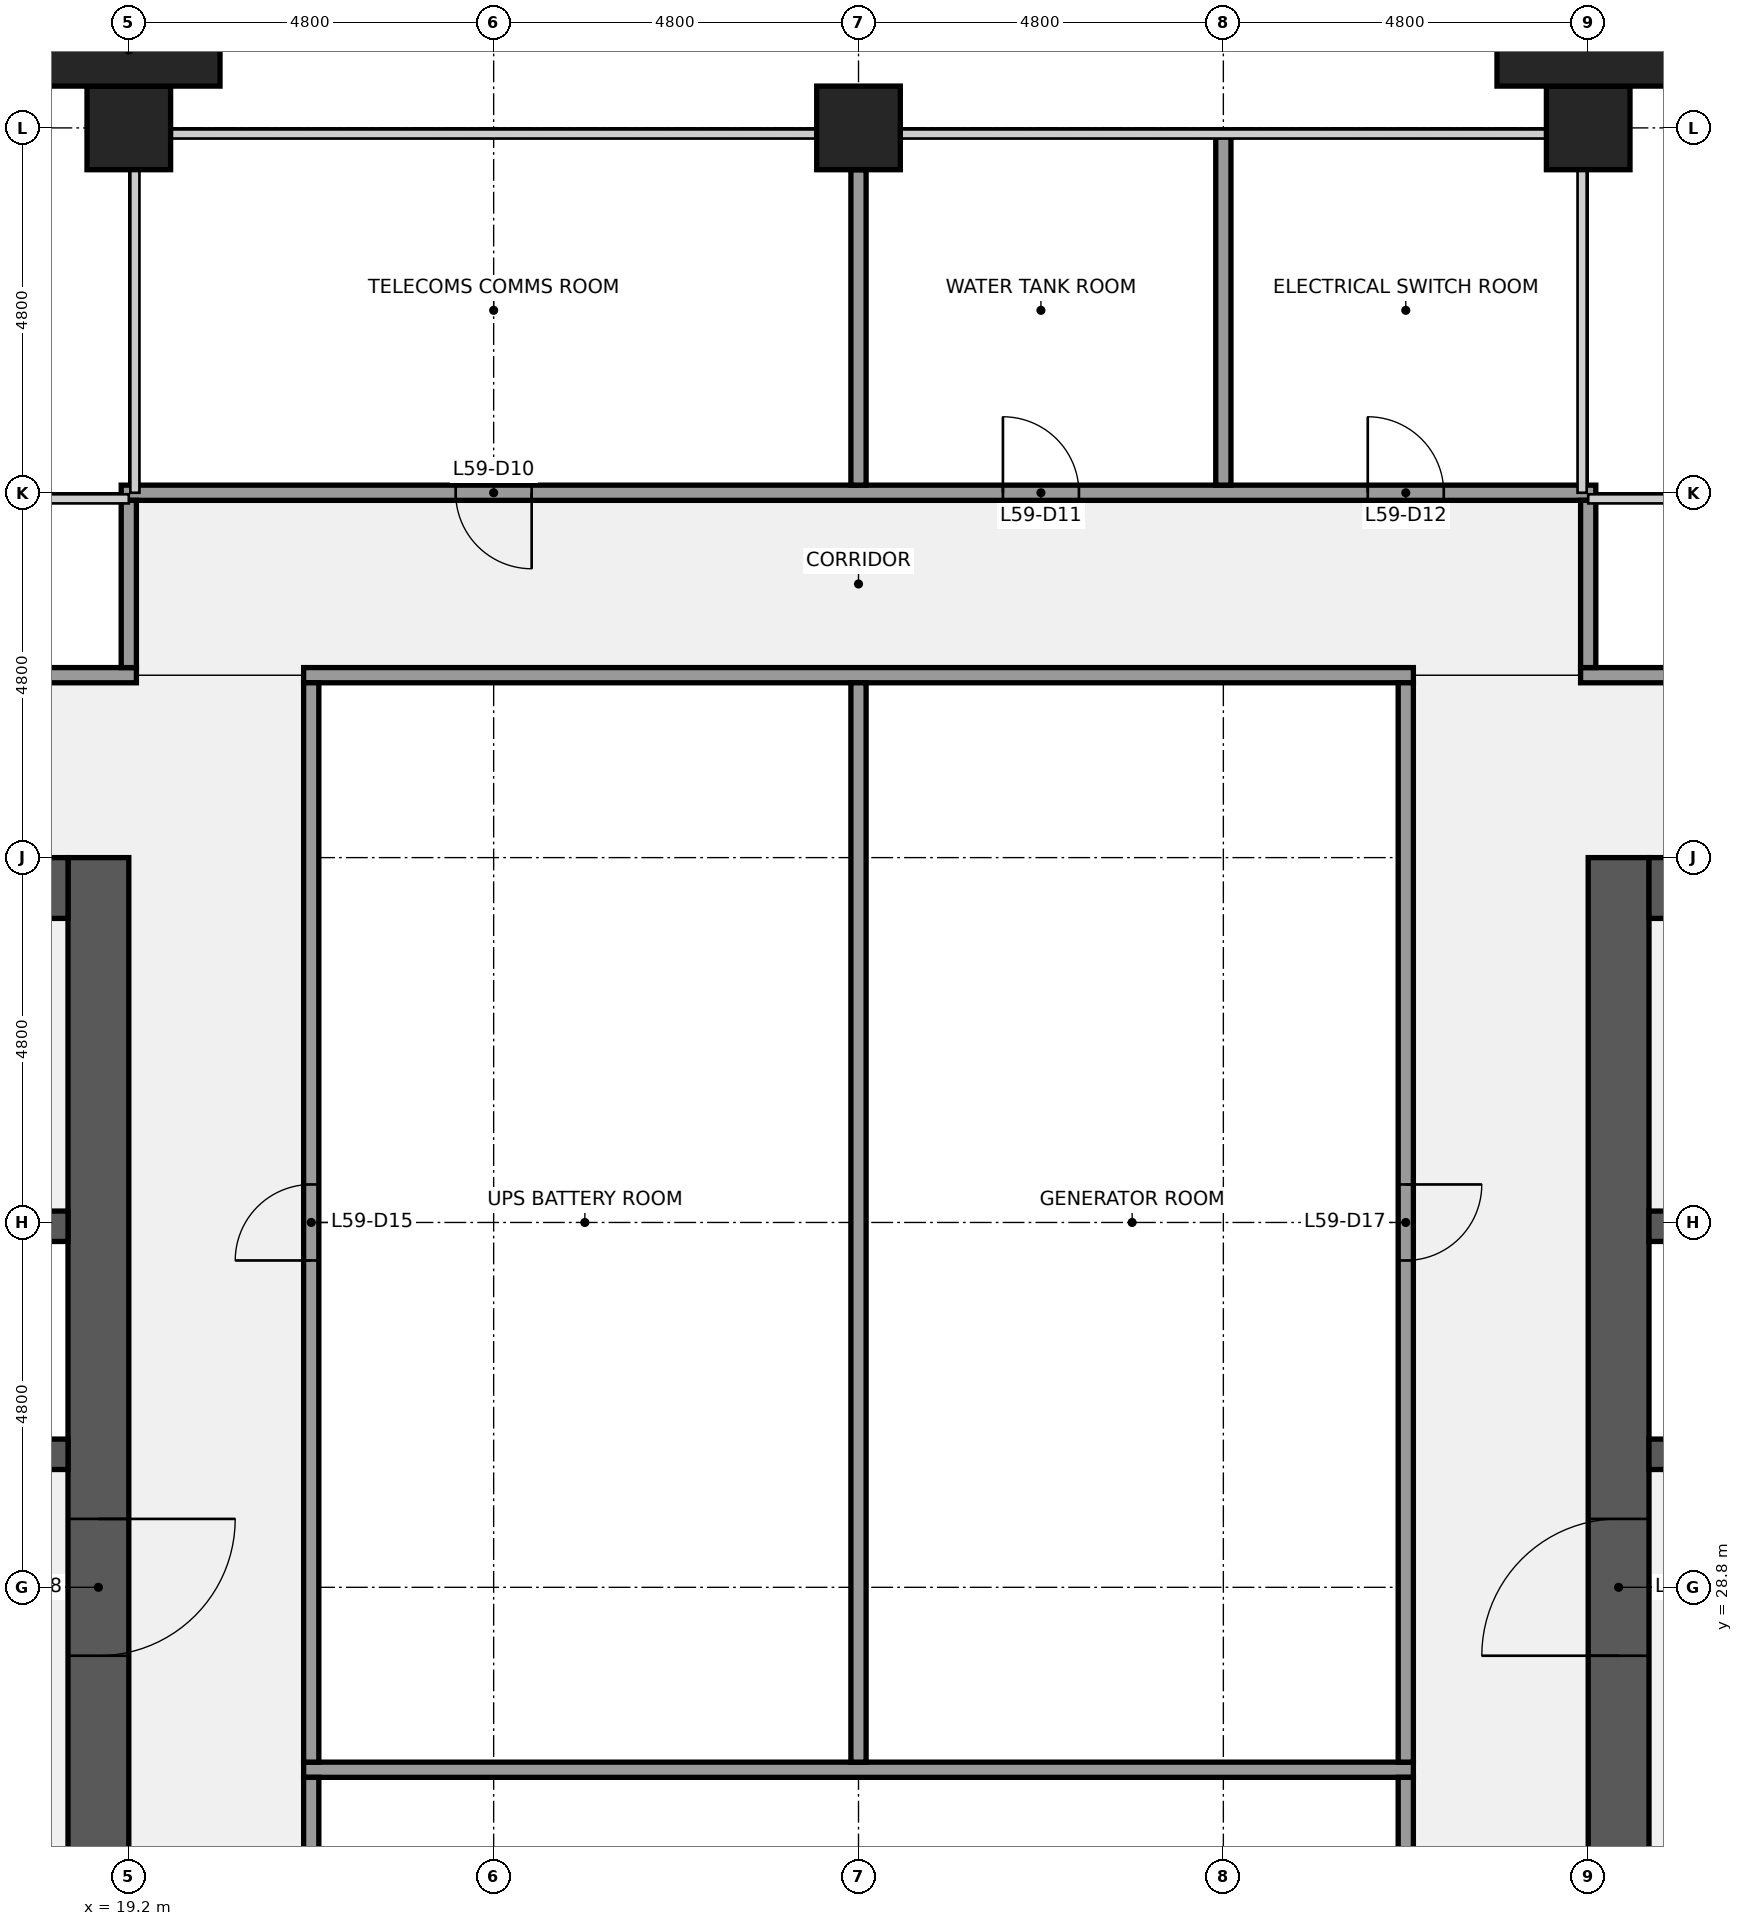
"""IFC4 building model, lengths in metres.
Left out: names, types, materials, properties, quantities, classifications, styles, units other than length and angle.
Written with IfcOpenShell. Run it as: python <this file> out.ifc"""

import sys

from ifc_helpers import new_model, si_unit, direction, frame, frame_2d, origin, origin_2d, place, context, subcontext, project, spatial, rectangle, extrude, element, fill, save


model = new_model("IFC4")
c1 = context("Model", 3, precision=1e-05, world=origin(), true_north=direction((0.0, 1.0)))
c2 = subcontext(c1, "Body", "Model", "MODEL_VIEW")
j1 = project(units=[si_unit("LENGTHUNIT", "METRE"), si_unit("PLANEANGLEUNIT", "RADIAN")], contexts=[c1])
p1 = place(None, origin())
s1 = spatial("IfcSite", under=j1, at=p1, CompositionType="ELEMENT")
p2 = place(p1, origin())
s2 = spatial("IfcBuilding", under=s1, at=p2, CompositionType="ELEMENT")
p3 = place(p2, frame((0.0, 0.0, 265.2)))
s3 = spatial("IfcBuildingStorey", under=s2, at=p3, CompositionType="ELEMENT", Elevation=265.2)
for number, where, z_axis, x_axis in (
    (1, (19.2, 48.0, 0.0), (0.0, 0.0, 1.0), (1.0, 0.0, 0.0)),
    (2, (28.8, 48.0, 0.0), (0.0, 0.0, 1.0), (1.0, 0.0, 0.0)),
    (3, (38.4, 48.0, 0.0), (0.0, 0.0, 1.0), (1.0, 0.0, 0.0)),
):
    element("IfcColumn", number, at=place(p3, frame(where, z_axis=z_axis, x_axis=x_axis)), inside=s3, PredefinedType="COLUMN", context=c2, shape_type="SweptSolid", body=[
        extrude(rectangle(XDim=1.1, YDim=1.1, at=origin_2d()), origin(), (0.0, 0.0, 1.0), 4.5),
    ])
p4 = place(p3, frame((18.8, 38.4, 0.0), z_axis=(0.0, 0.0, 1.0), x_axis=(0.0, -1.0, 0.0)))
e4 = element("IfcWall", 4, at=p4, inside=s3, PredefinedType="SHEAR", context=c2, shape_type="SweptSolid", body=[
    extrude(rectangle(XDim=28.8, YDim=0.8, at=frame_2d((14.4, 0.0))), origin(), (0.0, 0.0, 1.0), 4.1),
])
p5 = place(p4, frame((18.3, 0.0, 0.0)))
e5 = element("IfcOpeningElement", 5, at=p5, cuts=e4, PredefinedType="OPENING", context=c2, shape_type="SweptSolid", body=[
    extrude(rectangle(XDim=1.8, YDim=2.1, at=frame_2d((0.9, 1.05))), frame((0.0, 0.41, 0.0), z_axis=(0.0, -1.0, 0.0), x_axis=(1.0, 0.0, 0.0)), (0.0, 0.0, 1.0), 0.82),
])
p6 = place(p4, frame((8.7, 0.0, 0.0)))
e6 = element("IfcOpeningElement", 6, at=p6, cuts=e4, PredefinedType="OPENING", context=c2, shape_type="SweptSolid", body=[
    extrude(rectangle(XDim=1.8, YDim=2.1, at=frame_2d((0.9, 1.05))), frame((0.0, 0.41, 0.0), z_axis=(0.0, -1.0, 0.0), x_axis=(1.0, 0.0, 0.0)), (0.0, 0.0, 1.0), 0.82),
])
for number, where, z_axis, x_axis in (
    (7, (0.8, 30.55, 0.0), (0.0, 0.0, 1.0), (1.0, 0.0, 0.0)),
    (8, (0.8, 33.55, 0.0), (0.0, 0.0, 1.0), (1.0, 0.0, 0.0)),
):
    element("IfcWall", number, at=place(p3, frame(where, z_axis=z_axis, x_axis=x_axis)), inside=s3, PredefinedType="SHEAR", context=c2, shape_type="SweptSolid", body=[
        extrude(rectangle(XDim=17.6, YDim=0.4, at=frame_2d((8.8, 0.0))), origin(), (0.0, 0.0, 1.0), 4.1),
    ])
p7 = place(p3, frame((9.6, 38.0, 0.0), z_axis=(0.0, 0.0, 1.0), x_axis=(1.0, 0.0, 0.0)))
e9 = element("IfcWall", 9, at=p7, inside=s3, PredefinedType="SHEAR", context=c2, shape_type="SweptSolid", body=[
    extrude(rectangle(XDim=8.8, YDim=0.8, at=frame_2d((4.4, 0.0))), origin(), (0.0, 0.0, 1.0), 4.1),
])
p8 = place(p7, frame((6.65, 0.0, 0.0)))
e10 = element("IfcOpeningElement", 10, at=p8, cuts=e9, PredefinedType="OPENING", context=c2, shape_type="SweptSolid", body=[
    extrude(rectangle(XDim=1.1, YDim=2.1, at=frame_2d((0.55, 1.05))), frame((0.0, 0.41, 0.0), z_axis=(0.0, -1.0, 0.0), x_axis=(1.0, 0.0, 0.0)), (0.0, 0.0, 1.0), 0.82),
])
p9 = place(p3, frame((38.8, 9.6, 0.0), z_axis=(0.0, 0.0, 1.0), x_axis=(0.0, 1.0, 0.0)))
e11 = element("IfcWall", 11, at=p9, inside=s3, PredefinedType="SHEAR", context=c2, shape_type="SweptSolid", body=[
    extrude(rectangle(XDim=28.8, YDim=0.8, at=frame_2d((14.4, 0.0))), origin(), (0.0, 0.0, 1.0), 4.1),
])
p10 = place(p9, frame((8.7, 0.0, 0.0)))
e12 = element("IfcOpeningElement", 12, at=p10, cuts=e11, PredefinedType="OPENING", context=c2, shape_type="SweptSolid", body=[
    extrude(rectangle(XDim=1.8, YDim=2.1, at=frame_2d((0.9, 1.05))), frame((0.0, 0.41, 0.0), z_axis=(0.0, -1.0, 0.0), x_axis=(1.0, 0.0, 0.0)), (0.0, 0.0, 1.0), 0.82),
])
p11 = place(p9, frame((18.3, 0.0, 0.0)))
e13 = element("IfcOpeningElement", 13, at=p11, cuts=e11, PredefinedType="OPENING", context=c2, shape_type="SweptSolid", body=[
    extrude(rectangle(XDim=1.8, YDim=2.1, at=frame_2d((0.9, 1.05))), frame((0.0, 0.41, 0.0), z_axis=(0.0, -1.0, 0.0), x_axis=(1.0, 0.0, 0.0)), (0.0, 0.0, 1.0), 0.82),
])
for number, where, z_axis, x_axis in (
    (14, (39.2, 30.55, 0.0), (0.0, 0.0, 1.0), (1.0, 0.0, 0.0)),
    (15, (39.2, 33.55, 0.0), (0.0, 0.0, 1.0), (1.0, 0.0, 0.0)),
):
    element("IfcWall", number, at=place(p3, frame(where, z_axis=z_axis, x_axis=x_axis)), inside=s3, PredefinedType="SHEAR", context=c2, shape_type="SweptSolid", body=[
        extrude(rectangle(XDim=17.6, YDim=0.4, at=frame_2d((8.8, 0.0))), origin(), (0.0, 0.0, 1.0), 4.1),
    ])
p12 = place(p3, frame((39.2, 38.0, 0.0), z_axis=(0.0, 0.0, 1.0), x_axis=(1.0, 0.0, 0.0)))
e16 = element("IfcWall", 16, at=p12, inside=s3, PredefinedType="SHEAR", context=c2, shape_type="SweptSolid", body=[
    extrude(rectangle(XDim=4.0, YDim=0.8, at=frame_2d((2.0, 0.0))), origin(), (0.0, 0.0, 1.0), 4.1),
])
p13 = place(p12, frame((1.05, 0.0, 0.0)))
e17 = element("IfcOpeningElement", 17, at=p13, cuts=e16, PredefinedType="OPENING", context=c2, shape_type="SweptSolid", body=[
    extrude(rectangle(XDim=1.1, YDim=2.1, at=frame_2d((0.55, 1.05))), frame((0.0, 0.41, 0.0), z_axis=(0.0, -1.0, 0.0), x_axis=(1.0, 0.0, 0.0)), (0.0, 0.0, 1.0), 0.82),
])
p14 = place(p3, frame((21.5, 26.4, 0.0), z_axis=(0.0, 0.0, 1.0), x_axis=(1.0, 0.0, 0.0)))
e18 = element("IfcWall", 18, at=p14, inside=s3, PredefinedType="PARTITIONING", context=c2, shape_type="SweptSolid", body=[
    extrude(rectangle(XDim=14.6, YDim=0.2, at=frame_2d((7.3, 0.0))), origin(), (0.0, 0.0, 1.0), 2.993),
])
p15 = place(p3, frame((9.7, 40.8, 0.0), z_axis=(0.0, 0.0, 1.0), x_axis=(1.0, 0.0, 0.0)))
e19 = element("IfcWall", 19, at=p15, inside=s3, PredefinedType="PARTITIONING", context=c2, shape_type="SweptSolid", body=[
    extrude(rectangle(XDim=9.6, YDim=0.2, at=frame_2d((4.8, 0.0))), origin(), (0.0, 0.0, 1.0), 2.993),
])
p16 = place(p15, frame((0.65, 0.0, 0.0)))
e20 = element("IfcOpeningElement", 20, at=p16, cuts=e19, PredefinedType="OPENING", context=c2, shape_type="SweptSolid", body=[
    extrude(rectangle(XDim=1.0, YDim=2.1, at=frame_2d((0.5, 1.05))), frame((0.0, 0.11, 0.0), z_axis=(0.0, -1.0, 0.0), x_axis=(1.0, 0.0, 0.0)), (0.0, 0.0, 1.0), 0.22),
])
p17 = place(p3, frame((21.5, 40.8, 0.0), z_axis=(0.0, 0.0, 1.0), x_axis=(1.0, 0.0, 0.0)))
e21 = element("IfcWall", 21, at=p17, inside=s3, PredefinedType="PARTITIONING", context=c2, shape_type="SweptSolid", body=[
    extrude(rectangle(XDim=14.6, YDim=0.2, at=frame_2d((7.3, 0.0))), origin(), (0.0, 0.0, 1.0), 2.993),
])
p18 = place(p3, frame((38.3, 40.8, 0.0), z_axis=(0.0, 0.0, 1.0), x_axis=(1.0, 0.0, 0.0)))
e22 = element("IfcWall", 22, at=p18, inside=s3, PredefinedType="PARTITIONING", context=c2, shape_type="SweptSolid", body=[
    extrude(rectangle(XDim=4.8, YDim=0.2, at=frame_2d((2.4, 0.0))), origin(), (0.0, 0.0, 1.0), 2.993),
])
p19 = place(p18, frame((1.95, 0.0, 0.0)))
e23 = element("IfcOpeningElement", 23, at=p19, cuts=e22, PredefinedType="OPENING", context=c2, shape_type="SweptSolid", body=[
    extrude(rectangle(XDim=1.0, YDim=2.1, at=frame_2d((0.5, 1.05))), frame((0.0, 0.11, 0.0), z_axis=(0.0, -1.0, 0.0), x_axis=(1.0, 0.0, 0.0)), (0.0, 0.0, 1.0), 0.22),
])
p20 = place(p3, frame((19.1, 43.2, 0.0), z_axis=(0.0, 0.0, 1.0), x_axis=(1.0, 0.0, 0.0)))
e24 = element("IfcWall", 24, at=p20, inside=s3, PredefinedType="PARTITIONING", context=c2, shape_type="SweptSolid", body=[
    extrude(rectangle(XDim=19.4, YDim=0.2, at=frame_2d((9.7, 0.0))), origin(), (0.0, 0.0, 1.0), 2.993),
])
p21 = place(p20, frame((4.4, 0.0, 0.0)))
e25 = element("IfcOpeningElement", 25, at=p21, cuts=e24, PredefinedType="OPENING", context=c2, shape_type="SweptSolid", body=[
    extrude(rectangle(XDim=1.0, YDim=2.1, at=frame_2d((0.5, 1.05))), frame((0.0, 0.11, 0.0), z_axis=(0.0, -1.0, 0.0), x_axis=(1.0, 0.0, 0.0)), (0.0, 0.0, 1.0), 0.22),
])
p22 = place(p20, frame((11.6, 0.0, 0.0)))
e26 = element("IfcOpeningElement", 26, at=p22, cuts=e24, PredefinedType="OPENING", context=c2, shape_type="SweptSolid", body=[
    extrude(rectangle(XDim=1.0, YDim=2.1, at=frame_2d((0.5, 1.05))), frame((0.0, 0.11, 0.0), z_axis=(0.0, -1.0, 0.0), x_axis=(1.0, 0.0, 0.0)), (0.0, 0.0, 1.0), 0.22),
])
p23 = place(p20, frame((16.4, 0.0, 0.0)))
e27 = element("IfcOpeningElement", 27, at=p23, cuts=e24, PredefinedType="OPENING", context=c2, shape_type="SweptSolid", body=[
    extrude(rectangle(XDim=1.0, YDim=2.1, at=frame_2d((0.5, 1.05))), frame((0.0, 0.11, 0.0), z_axis=(0.0, -1.0, 0.0), x_axis=(1.0, 0.0, 0.0)), (0.0, 0.0, 1.0), 0.22),
])
p24 = place(p3, frame((19.2, 40.9, 0.0), z_axis=(0.0, 0.0, 1.0), x_axis=(0.0, 1.0, 0.0)))
e28 = element("IfcWall", 28, at=p24, inside=s3, PredefinedType="PARTITIONING", context=c2, shape_type="SweptSolid", body=[
    extrude(rectangle(XDim=2.2, YDim=0.2, at=frame_2d((1.1, 0.0))), origin(), (0.0, 0.0, 1.0), 2.993),
])
p25 = place(p3, frame((21.6, 19.3, 0.0), z_axis=(0.0, 0.0, 1.0), x_axis=(0.0, 1.0, 0.0)))
e29 = element("IfcWall", 29, at=p25, inside=s3, PredefinedType="PARTITIONING", context=c2, shape_type="SweptSolid", body=[
    extrude(rectangle(XDim=7.0, YDim=0.2, at=frame_2d((3.5, 0.0))), origin(), (0.0, 0.0, 1.0), 2.993),
])
p26 = place(p25, frame((3.0, 0.0, 0.0)))
e30 = element("IfcOpeningElement", 30, at=p26, cuts=e29, PredefinedType="OPENING", context=c2, shape_type="SweptSolid", body=[
    extrude(rectangle(XDim=1.0, YDim=2.1, at=frame_2d((0.5, 1.05))), frame((0.0, 0.11, 0.0), z_axis=(0.0, -1.0, 0.0), x_axis=(1.0, 0.0, 0.0)), (0.0, 0.0, 1.0), 0.22),
])
p27 = place(p3, frame((21.6, 26.5, 0.0), z_axis=(0.0, 0.0, 1.0), x_axis=(0.0, 1.0, 0.0)))
e31 = element("IfcWall", 31, at=p27, inside=s3, PredefinedType="PARTITIONING", context=c2, shape_type="SweptSolid", body=[
    extrude(rectangle(XDim=14.2, YDim=0.2, at=frame_2d((7.1, 0.0))), origin(), (0.0, 0.0, 1.0), 2.993),
])
p28 = place(p27, frame((6.6, 0.0, 0.0)))
e32 = element("IfcOpeningElement", 32, at=p28, cuts=e31, PredefinedType="OPENING", context=c2, shape_type="SweptSolid", body=[
    extrude(rectangle(XDim=1.0, YDim=2.1, at=frame_2d((0.5, 1.05))), frame((0.0, 0.11, 0.0), z_axis=(0.0, -1.0, 0.0), x_axis=(1.0, 0.0, 0.0)), (0.0, 0.0, 1.0), 0.22),
])
p29 = place(p3, frame((28.8, 26.5, 0.0), z_axis=(0.0, 0.0, 1.0), x_axis=(0.0, 1.0, 0.0)))
e33 = element("IfcWall", 33, at=p29, inside=s3, PredefinedType="PARTITIONING", context=c2, shape_type="SweptSolid", body=[
    extrude(rectangle(XDim=14.2, YDim=0.2, at=frame_2d((7.1, 0.0))), origin(), (0.0, 0.0, 1.0), 2.993),
])
p30 = place(p3, frame((28.8, 43.3, 0.0), z_axis=(0.0, 0.0, 1.0), x_axis=(0.0, 1.0, 0.0)))
e34 = element("IfcWall", 34, at=p30, inside=s3, PredefinedType="PARTITIONING", context=c2, shape_type="SweptSolid", body=[
    extrude(rectangle(XDim=4.15, YDim=0.2, at=frame_2d((2.075, 0.0))), origin(), (0.0, 0.0, 1.0), 2.993),
])
p31 = place(p3, frame((33.6, 43.3, 0.0), z_axis=(0.0, 0.0, 1.0), x_axis=(0.0, 1.0, 0.0)))
e35 = element("IfcWall", 35, at=p31, inside=s3, PredefinedType="PARTITIONING", context=c2, shape_type="SweptSolid", body=[
    extrude(rectangle(XDim=4.6, YDim=0.2, at=frame_2d((2.3, 0.0))), origin(), (0.0, 0.0, 1.0), 2.993),
])
p32 = place(p3, frame((36.0, 19.3, 0.0), z_axis=(0.0, 0.0, 1.0), x_axis=(0.0, 1.0, 0.0)))
e36 = element("IfcWall", 36, at=p32, inside=s3, PredefinedType="PARTITIONING", context=c2, shape_type="SweptSolid", body=[
    extrude(rectangle(XDim=7.0, YDim=0.2, at=frame_2d((3.5, 0.0))), origin(), (0.0, 0.0, 1.0), 2.993),
])
p33 = place(p3, frame((36.0, 26.5, 0.0), z_axis=(0.0, 0.0, 1.0), x_axis=(0.0, 1.0, 0.0)))
e37 = element("IfcWall", 37, at=p33, inside=s3, PredefinedType="PARTITIONING", context=c2, shape_type="SweptSolid", body=[
    extrude(rectangle(XDim=14.2, YDim=0.2, at=frame_2d((7.1, 0.0))), origin(), (0.0, 0.0, 1.0), 2.993),
])
p34 = place(p33, frame((6.6, 0.0, 0.0)))
e38 = element("IfcOpeningElement", 38, at=p34, cuts=e37, PredefinedType="OPENING", context=c2, shape_type="SweptSolid", body=[
    extrude(rectangle(XDim=1.0, YDim=2.1, at=frame_2d((0.5, 1.05))), frame((0.0, 0.11, 0.0), z_axis=(0.0, -1.0, 0.0), x_axis=(1.0, 0.0, 0.0)), (0.0, 0.0, 1.0), 0.22),
])
p35 = place(p3, frame((38.4, 40.9, 0.0), z_axis=(0.0, 0.0, 1.0), x_axis=(0.0, 1.0, 0.0)))
e39 = element("IfcWall", 39, at=p35, inside=s3, PredefinedType="PARTITIONING", context=c2, shape_type="SweptSolid", body=[
    extrude(rectangle(XDim=2.2, YDim=0.2, at=frame_2d((1.1, 0.0))), origin(), (0.0, 0.0, 1.0), 2.993),
])
for number, where, z_axis, x_axis in (
    (40, (19.2, 49.025, 0.0), (0.0, 0.0, 1.0), (1.0, 0.0, 0.0)),
    (41, (38.4, 49.025, 0.0), (0.0, 0.0, 1.0), (1.0, 0.0, 0.0)),
):
    element("IfcColumn", number, at=place(p3, frame(where, z_axis=z_axis, x_axis=x_axis)), inside=s3, PredefinedType="PILASTER", context=c2, shape_type="SweptSolid", body=[
        extrude(rectangle(XDim=2.4, YDim=0.95, at=origin_2d()), origin(), (0.0, 0.0, 1.0), 4.5),
    ])
p36 = place(p6, origin())
e42 = element("IfcDoor", 42, at=p36, inside=s3, OperationType="DOUBLE_DOOR_SINGLE_SWING", PredefinedType="DOOR", context=c2, shape_type="SweptSolid", body=[
    extrude(rectangle(XDim=1.8, YDim=2.1, at=frame_2d((0.9, 1.05))), frame((0.0, 0.025, 0.0), z_axis=(0.0, -1.0, 0.0), x_axis=(1.0, 0.0, 0.0)), (0.0, 0.0, 1.0), 0.05),
])
fill(e6, e42)
p37 = place(p11, origin())
e43 = element("IfcDoor", 43, at=p37, inside=s3, OperationType="DOUBLE_DOOR_SINGLE_SWING", PredefinedType="DOOR", context=c2, shape_type="SweptSolid", body=[
    extrude(rectangle(XDim=1.8, YDim=2.1, at=frame_2d((0.9, 1.05))), frame((0.0, 0.025, 0.0), z_axis=(0.0, -1.0, 0.0), x_axis=(1.0, 0.0, 0.0)), (0.0, 0.0, 1.0), 0.05),
])
fill(e13, e43)
p38 = place(p21, origin())
e44 = element("IfcDoor", 44, at=p38, inside=s3, OperationType="SINGLE_SWING_RIGHT", PredefinedType="DOOR", context=c2, shape_type="SweptSolid", body=[
    extrude(rectangle(XDim=1.0, YDim=2.1, at=frame_2d((0.5, 1.05))), frame((0.0, 0.025, 0.0), z_axis=(0.0, -1.0, 0.0), x_axis=(1.0, 0.0, 0.0)), (0.0, 0.0, 1.0), 0.05),
])
fill(e25, e44)
p39 = place(p22, origin())
e45 = element("IfcDoor", 45, at=p39, inside=s3, OperationType="SINGLE_SWING_LEFT", PredefinedType="DOOR", context=c2, shape_type="SweptSolid", body=[
    extrude(rectangle(XDim=1.0, YDim=2.1, at=frame_2d((0.5, 1.05))), frame((0.0, 0.025, 0.0), z_axis=(0.0, -1.0, 0.0), x_axis=(1.0, 0.0, 0.0)), (0.0, 0.0, 1.0), 0.05),
])
fill(e26, e45)
p40 = place(p23, origin())
e46 = element("IfcDoor", 46, at=p40, inside=s3, OperationType="SINGLE_SWING_LEFT", PredefinedType="DOOR", context=c2, shape_type="SweptSolid", body=[
    extrude(rectangle(XDim=1.0, YDim=2.1, at=frame_2d((0.5, 1.05))), frame((0.0, 0.025, 0.0), z_axis=(0.0, -1.0, 0.0), x_axis=(1.0, 0.0, 0.0)), (0.0, 0.0, 1.0), 0.05),
])
fill(e27, e46)
p41 = place(p28, origin())
e47 = element("IfcDoor", 47, at=p41, inside=s3, OperationType="SINGLE_SWING_LEFT", PredefinedType="DOOR", context=c2, shape_type="SweptSolid", body=[
    extrude(rectangle(XDim=1.0, YDim=2.1, at=frame_2d((0.5, 1.05))), frame((0.0, 0.025, 0.0), z_axis=(0.0, -1.0, 0.0), x_axis=(1.0, 0.0, 0.0)), (0.0, 0.0, 1.0), 0.05),
])
fill(e32, e47)
p42 = place(p34, origin())
e48 = element("IfcDoor", 48, at=p42, inside=s3, OperationType="SINGLE_SWING_RIGHT", PredefinedType="DOOR", context=c2, shape_type="SweptSolid", body=[
    extrude(rectangle(XDim=1.0, YDim=2.1, at=frame_2d((0.5, 1.05))), frame((0.0, 0.025, 0.0), z_axis=(0.0, -1.0, 0.0), x_axis=(1.0, 0.0, 0.0)), (0.0, 0.0, 1.0), 0.05),
])
fill(e38, e48)
save(model, sys.argv[1])
